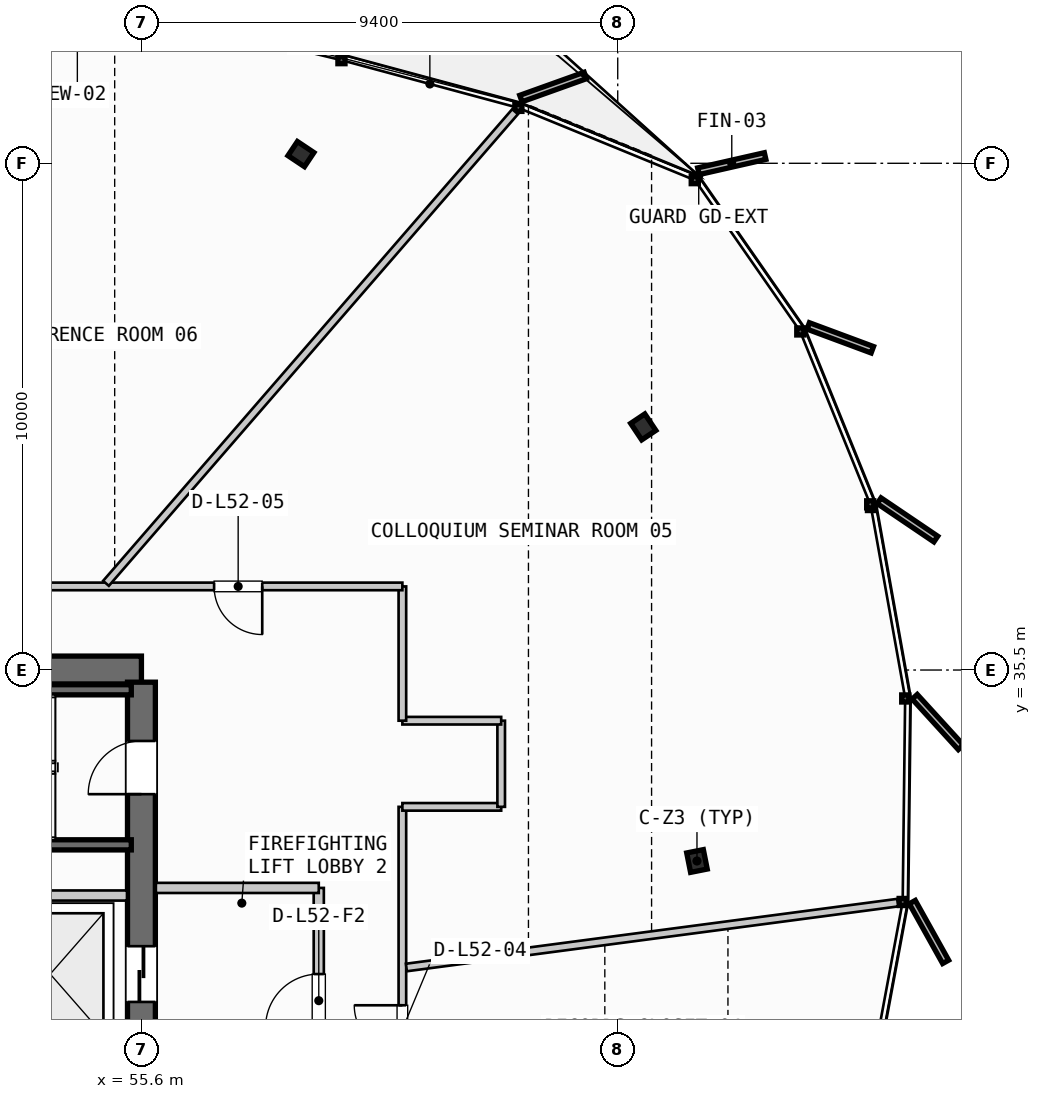
"""IFC4 building model, lengths in metres.
Left out: names, types, materials, properties, quantities, classifications, styles, units other than length and angle.
Written with IfcOpenShell. Run it as: python <this file> out.ifc"""

import sys

from ifc_helpers import new_model, si_unit, direction, frame, frame_2d, origin, origin_2d, place, context, subcontext, project, spatial, rectangle, i_section, extrude, source, transform, mapped, element, fill, save


model = new_model("IFC4")
c1 = context("Model", 3, precision=1e-05, world=origin(), true_north=direction((0.0, 1.0)))
c2 = subcontext(c1, "Body", "Model", "MODEL_VIEW")
j1 = project(units=[si_unit("LENGTHUNIT", "METRE"), si_unit("PLANEANGLEUNIT", "RADIAN")], contexts=[c1])
p1 = place(None, origin())
s1 = spatial("IfcSite", under=j1, at=p1, CompositionType="ELEMENT")
p2 = place(p1, origin())
s2 = spatial("IfcBuilding", under=s1, at=p2, CompositionType="ELEMENT")
p3 = place(p2, frame((0.0, 0.0, 200.9)))
s3 = spatial("IfcBuildingStorey", under=s2, at=p3, CompositionType="ELEMENT", Elevation=200.9)
p4 = place(p3, frame((55.6, 35.5, 0.0), z_axis=(0.0, 0.0, 1.0), x_axis=(-1.0, 0.0, 0.0)))
e1 = element("IfcWall", 1, at=p4, inside=s3, PredefinedType="SHEAR", context=c2, shape_type="SweptSolid", body=[
    extrude(rectangle(XDim=17.6, YDim=0.55, at=frame_2d((8.8, 0.0))), origin(), (0.0, 0.0, 1.0), 3.26),
])
p5 = place(p4, frame((8.05, 0.0, 0.0)))
e2 = element("IfcOpeningElement", 2, at=p5, cuts=e1, PredefinedType="OPENING", context=c2, shape_type="SweptSolid", body=[
    extrude(rectangle(XDim=1.5, YDim=2.2, at=frame_2d((0.75, 1.1))), frame((0.0, 0.285, 0.0), z_axis=(0.0, -1.0, 0.0), x_axis=(1.0, 0.0, 0.0)), (0.0, 0.0, 1.0), 0.57),
])
p6 = place(p4, frame((15.1, 0.0, 0.0)))
e3 = element("IfcOpeningElement", 3, at=p6, cuts=e1, PredefinedType="OPENING", context=c2, shape_type="SweptSolid", body=[
    extrude(rectangle(XDim=0.95, YDim=2.15, at=frame_2d((0.475, 1.075))), frame((0.0, 0.285, 0.0), z_axis=(0.0, -1.0, 0.0), x_axis=(1.0, 0.0, 0.0)), (0.0, 0.0, 1.0), 0.57),
])
p7 = place(p4, frame((12.6, 0.0, 0.0)))
e4 = element("IfcOpeningElement", 4, at=p7, cuts=e1, PredefinedType="OPENING", context=c2, shape_type="SweptSolid", body=[
    extrude(rectangle(XDim=0.95, YDim=2.15, at=frame_2d((0.475, 1.075))), frame((0.0, 0.285, 0.0), z_axis=(0.0, -1.0, 0.0), x_axis=(1.0, 0.0, 0.0)), (0.0, 0.0, 1.0), 0.57),
])
p8 = place(p4, frame((10.45, 0.0, 0.0)))
e5 = element("IfcOpeningElement", 5, at=p8, cuts=e1, PredefinedType="OPENING", context=c2, shape_type="SweptSolid", body=[
    extrude(rectangle(XDim=0.95, YDim=2.15, at=frame_2d((0.475, 1.075))), frame((0.0, 0.285, 0.0), z_axis=(0.0, -1.0, 0.0), x_axis=(1.0, 0.0, 0.0)), (0.0, 0.0, 1.0), 0.57),
])
p9 = place(p3, frame((55.6, 20.34, 0.0), z_axis=(0.0, 0.0, 1.0), x_axis=(0.0, 1.0, 0.0)))
e6 = element("IfcWall", 6, at=p9, inside=s3, PredefinedType="SHEAR", context=c2, shape_type="SweptSolid", body=[
    extrude(rectangle(XDim=14.92, YDim=0.55, at=frame_2d((7.46, 0.0))), origin(), (0.0, 0.0, 1.0), 3.26),
])
p10 = place(p9, frame((12.71, 0.0, 0.0)))
e7 = element("IfcOpeningElement", 7, at=p10, cuts=e6, PredefinedType="OPENING", context=c2, shape_type="SweptSolid", body=[
    extrude(rectangle(XDim=1.05, YDim=2.15, at=frame_2d((0.525, 1.075))), frame((0.0, 0.285, 0.0), z_axis=(0.0, -1.0, 0.0), x_axis=(1.0, 0.0, 0.0)), (0.0, 0.0, 1.0), 0.57),
])
p11 = place(p9, frame((8.61, 0.0, 0.0)))
e8 = element("IfcOpeningElement", 8, at=p11, cuts=e6, PredefinedType="OPENING", context=c2, shape_type="SweptSolid", body=[
    extrude(rectangle(XDim=1.1, YDim=2.2, at=frame_2d((0.55, 1.1))), frame((0.0, 0.285, 0.0), z_axis=(0.0, -1.0, 0.0), x_axis=(1.0, 0.0, 0.0)), (0.0, 0.0, 1.0), 0.57),
])
m1 = source(origin(), c2, "Body", "SweptSolid", [
    extrude(i_section(OverallWidth=0.391, OverallDepth=0.335, WebThickness=0.023, FlangeThickness=0.034, FilletRadius=0.015, at=origin_2d()), origin(), (0.0, 0.0, 1.0), 3.26),
])
for number, where, z_axis, x_axis in (
    (9, (66.564, 31.731, 0.0), (0.0, 0.0, 1.0), (0.981, 0.195, 0.0)),
    (10, (65.504, 40.298, 0.0), (0.0, 0.0, 1.0), (0.831, 0.556, 0.0)),
    (11, (58.748, 45.681, 0.0), (0.0, 0.0, 1.0), (0.556, 0.831, 0.0)),
):
    element("IfcColumn", number, at=place(p3, frame(where, z_axis=z_axis, x_axis=x_axis)), inside=s3, PredefinedType="COLUMN", context=c2, shape_type="MappedRepresentation", body=[
        mapped(m1, transform((0.0, 0.0, 0.0), scale=1.0)),
    ])
for number, where, z_axis, x_axis in (
    (12, (48.05, 35.11, 0.0), (0.0, 0.0, 1.0), (1.0, 0.0, 0.0)),
    (13, (55.4, 32.05, 0.0), (0.0, 0.0, 1.0), (-1.0, 0.0, 0.0)),
):
    element("IfcWall", number, at=place(p3, frame(where, z_axis=z_axis, x_axis=x_axis)), inside=s3, PredefinedType="SHEAR", context=c2, shape_type="SweptSolid", body=[
        extrude(rectangle(XDim=7.35, YDim=0.2, at=frame_2d((3.675, 0.0))), origin(), (0.0, 0.0, 1.0), 3.26),
    ])
p12 = place(p3, frame((52.45, 31.05, 0.0), z_axis=(0.0, 0.0, 1.0), x_axis=(1.0, 0.0, 0.0)))
e14 = element("IfcWall", 14, at=p12, inside=s3, PredefinedType="PARTITIONING", context=c2, shape_type="SweptSolid", body=[
    extrude(rectangle(XDim=2.865, YDim=0.2, at=frame_2d((1.433, 0.0))), origin(), (0.0, 0.0, 1.0), 2.595),
])
p13 = place(p3, frame((59.1, 26.8, 0.0), z_axis=(0.0, 0.0, 1.0), x_axis=(0.0, 1.0, 0.0)))
e15 = element("IfcWall", 15, at=p13, inside=s3, PredefinedType="PARTITIONING", context=c2, shape_type="SweptSolid", body=[
    extrude(rectangle(XDim=4.4, YDim=0.2, at=frame_2d((2.2, 0.0))), origin(), (0.0, 0.0, 1.0), 2.595),
])
p14 = place(p13, frame((1.65, 0.0, 0.0)))
e16 = element("IfcOpeningElement", 16, at=p14, cuts=e15, PredefinedType="OPENING", context=c2, shape_type="SweptSolid", body=[
    extrude(rectangle(XDim=1.05, YDim=2.15, at=frame_2d((0.525, 1.075))), frame((0.0, 0.11, 0.0), z_axis=(0.0, -1.0, 0.0), x_axis=(1.0, 0.0, 0.0)), (0.0, 0.0, 1.0), 0.22),
])
p15 = place(p3, frame((55.885, 31.2, 0.0), z_axis=(0.0, 0.0, 1.0), x_axis=(1.0, 0.0, 0.0)))
e17 = element("IfcWall", 17, at=p15, inside=s3, PredefinedType="PARTITIONING", context=c2, shape_type="SweptSolid", body=[
    extrude(rectangle(XDim=3.215, YDim=0.2, at=frame_2d((1.607, 0.0))), origin(), (0.0, 0.0, 1.0), 2.595),
])
p16 = place(p3, frame((60.75, 22.8, 0.0), z_axis=(0.0, 0.0, 1.0), x_axis=(0.0, 1.0, 0.0)))
e18 = element("IfcWall", 18, at=p16, inside=s3, PredefinedType="PARTITIONING", context=c2, shape_type="SweptSolid", body=[
    extrude(rectangle(XDim=10.0, YDim=0.15, at=frame_2d((5.0, 0.0))), origin(), (0.0, 0.0, 1.0), 2.595),
])
p17 = place(p16, frame((2.013, 0.0, 0.0)))
e19 = element("IfcOpeningElement", 19, at=p17, cuts=e18, PredefinedType="OPENING", context=c2, shape_type="SweptSolid", body=[
    extrude(rectangle(XDim=0.95, YDim=2.15, at=frame_2d((0.475, 1.075))), frame((0.0, 0.085, 0.0), z_axis=(0.0, -1.0, 0.0), x_axis=(1.0, 0.0, 0.0)), (0.0, 0.0, 1.0), 0.17),
])
p18 = place(p16, frame((5.134, 0.0, 0.0)))
e20 = element("IfcOpeningElement", 20, at=p18, cuts=e18, PredefinedType="OPENING", context=c2, shape_type="SweptSolid", body=[
    extrude(rectangle(XDim=0.95, YDim=2.15, at=frame_2d((0.475, 1.075))), frame((0.0, 0.085, 0.0), z_axis=(0.0, -1.0, 0.0), x_axis=(1.0, 0.0, 0.0)), (0.0, 0.0, 1.0), 0.17),
])
p19 = place(p3, frame((60.75, 32.8, 0.0), z_axis=(0.0, 0.0, 1.0), x_axis=(1.0, 0.0, 0.0)))
e21 = element("IfcWall", 21, at=p19, inside=s3, PredefinedType="PARTITIONING", context=c2, shape_type="SweptSolid", body=[
    extrude(rectangle(XDim=1.95, YDim=0.15, at=frame_2d((0.975, 0.0))), origin(), (0.0, 0.0, 1.0), 2.595),
])
p20 = place(p3, frame((62.7, 32.8, 0.0), z_axis=(0.0, 0.0, 1.0), x_axis=(0.0, 1.0, 0.0)))
e22 = element("IfcWall", 22, at=p20, inside=s3, PredefinedType="PARTITIONING", context=c2, shape_type="SweptSolid", body=[
    extrude(rectangle(XDim=1.7, YDim=0.15, at=frame_2d((0.85, 0.0))), origin(), (0.0, 0.0, 1.0), 2.595),
])
p21 = place(p3, frame((62.7, 34.5, 0.0), z_axis=(0.0, 0.0, 1.0), x_axis=(-1.0, 0.0, 0.0)))
e23 = element("IfcWall", 23, at=p21, inside=s3, PredefinedType="PARTITIONING", context=c2, shape_type="SweptSolid", body=[
    extrude(rectangle(XDim=1.95, YDim=0.15, at=frame_2d((0.975, 0.0))), origin(), (0.0, 0.0, 1.0), 2.595),
])
p22 = place(p3, frame((60.75, 34.5, 0.0), z_axis=(0.0, 0.0, 1.0), x_axis=(0.0, 1.0, 0.0)))
e24 = element("IfcWall", 24, at=p22, inside=s3, PredefinedType="PARTITIONING", context=c2, shape_type="SweptSolid", body=[
    extrude(rectangle(XDim=2.65, YDim=0.15, at=frame_2d((1.325, 0.0))), origin(), (0.0, 0.0, 1.0), 2.595),
])
p23 = place(p3, frame((60.75, 37.15, 0.0), z_axis=(0.0, 0.0, 1.0), x_axis=(-1.0, 0.0, 0.0)))
e25 = element("IfcWall", 25, at=p23, inside=s3, PredefinedType="PARTITIONING", context=c2, shape_type="SweptSolid", body=[
    extrude(rectangle(XDim=28.35, YDim=0.15, at=frame_2d((14.175, 0.0))), origin(), (0.0, 0.0, 1.0), 2.595),
])
p24 = place(p23, frame((2.766, 0.0, 0.0)))
e26 = element("IfcOpeningElement", 26, at=p24, cuts=e25, PredefinedType="OPENING", context=c2, shape_type="SweptSolid", body=[
    extrude(rectangle(XDim=0.95, YDim=2.15, at=frame_2d((0.475, 1.075))), frame((0.0, 0.085, 0.0), z_axis=(0.0, -1.0, 0.0), x_axis=(1.0, 0.0, 0.0)), (0.0, 0.0, 1.0), 0.17),
])
p25 = place(p23, frame((8.968, 0.0, 0.0)))
e27 = element("IfcOpeningElement", 27, at=p25, cuts=e25, PredefinedType="OPENING", context=c2, shape_type="SweptSolid", body=[
    extrude(rectangle(XDim=0.95, YDim=2.15, at=frame_2d((0.475, 1.075))), frame((0.0, 0.085, 0.0), z_axis=(0.0, -1.0, 0.0), x_axis=(1.0, 0.0, 0.0)), (0.0, 0.0, 1.0), 0.17),
])
p26 = place(p23, frame((13.496, 0.0, 0.0)))
e28 = element("IfcOpeningElement", 28, at=p26, cuts=e25, PredefinedType="OPENING", context=c2, shape_type="SweptSolid", body=[
    extrude(rectangle(XDim=0.95, YDim=2.15, at=frame_2d((0.475, 1.075))), frame((0.0, 0.085, 0.0), z_axis=(0.0, -1.0, 0.0), x_axis=(1.0, 0.0, 0.0)), (0.0, 0.0, 1.0), 0.17),
])
p27 = place(p23, frame((16.571, 0.0, 0.0)))
e29 = element("IfcOpeningElement", 29, at=p27, cuts=e25, PredefinedType="OPENING", context=c2, shape_type="SweptSolid", body=[
    extrude(rectangle(XDim=0.95, YDim=2.15, at=frame_2d((0.475, 1.075))), frame((0.0, 0.085, 0.0), z_axis=(0.0, -1.0, 0.0), x_axis=(1.0, 0.0, 0.0)), (0.0, 0.0, 1.0), 0.17),
])
p28 = place(p23, frame((23.002, 0.0, 0.0)))
e30 = element("IfcOpeningElement", 30, at=p28, cuts=e25, PredefinedType="OPENING", context=c2, shape_type="SweptSolid", body=[
    extrude(rectangle(XDim=0.95, YDim=2.15, at=frame_2d((0.475, 1.075))), frame((0.0, 0.085, 0.0), z_axis=(0.0, -1.0, 0.0), x_axis=(1.0, 0.0, 0.0)), (0.0, 0.0, 1.0), 0.17),
])
p29 = place(p3, frame((60.829, 29.63, 0.0), z_axis=(0.0, 0.0, 1.0), x_axis=(0.991403406957, 0.130840684324, 0.0)))
e31 = element("IfcWall", 31, at=p29, inside=s3, PredefinedType="PARTITIONING", context=c2, shape_type="SweptSolid", body=[
    extrude(rectangle(XDim=9.779, YDim=0.15, at=frame_2d((4.89, 0.0))), origin(), (0.0, 0.0, 1.0), 2.595),
])
p30 = place(p3, frame((54.9, 37.21, 0.0), z_axis=(0.0, 0.0, 1.0), x_axis=(0.655252574178, 0.75540986493, 0.0)))
e32 = element("IfcWall", 32, at=p30, inside=s3, PredefinedType="PARTITIONING", context=c2, shape_type="SweptSolid", body=[
    extrude(rectangle(XDim=12.322, YDim=0.15, at=frame_2d((6.161, 0.0))), origin(), (0.0, 0.0, 1.0), 2.595),
])
m2 = source(origin(), c2, "Body", "SweptSolid", [
    extrude(rectangle(XDim=1.05, YDim=2.15, at=frame_2d((0.525, 1.075))), frame((0.0, 0.025, 0.0), z_axis=(0.0, -1.0, 0.0), x_axis=(1.0, 0.0, 0.0)), (0.0, 0.0, 1.0), 0.05),
])
p31 = place(p10, origin())
e33 = element("IfcDoor", 33, at=p31, inside=s3, OperationType="SINGLE_SWING_LEFT", PredefinedType="DOOR", context=c2, shape_type="MappedRepresentation", body=[
    mapped(m2, transform((0.0, 0.0, 0.0), scale=1.0)),
])
fill(e7, e33)
m3 = source(origin(), c2, "Body", "SweptSolid", [
    extrude(rectangle(XDim=1.1, YDim=2.2, at=frame_2d((0.55, 1.1))), frame((0.0, 0.025, 0.0), z_axis=(0.0, -1.0, 0.0), x_axis=(1.0, 0.0, 0.0)), (0.0, 0.0, 1.0), 0.05),
])
p32 = place(p11, origin())
e34 = element("IfcDoor", 34, at=p32, inside=s3, OperationType="SLIDING_TO_RIGHT", PredefinedType="DOOR", context=c2, shape_type="MappedRepresentation", body=[
    mapped(m3, transform((0.0, 0.0, 0.0), scale=1.0)),
])
fill(e8, e34)
p33 = place(p14, origin())
e35 = element("IfcDoor", 35, at=p33, inside=s3, OperationType="SINGLE_SWING_LEFT", PredefinedType="DOOR", context=c2, shape_type="MappedRepresentation", body=[
    mapped(m2, transform((0.0, 0.0, 0.0), scale=1.0)),
])
fill(e16, e35)
m4 = source(origin(), c2, "Body", "SweptSolid", [
    extrude(rectangle(XDim=0.95, YDim=2.15, at=frame_2d((0.475, 1.075))), frame((0.0, 0.025, 0.0), z_axis=(0.0, -1.0, 0.0), x_axis=(1.0, 0.0, 0.0)), (0.0, 0.0, 1.0), 0.05),
])
p34 = place(p18, origin())
e36 = element("IfcDoor", 36, at=p34, inside=s3, OperationType="SINGLE_SWING_RIGHT", PredefinedType="DOOR", context=c2, shape_type="MappedRepresentation", body=[
    mapped(m4, transform((0.0, 0.0, 0.0), scale=1.0)),
])
fill(e20, e36)
p35 = place(p24, origin())
e37 = element("IfcDoor", 37, at=p35, inside=s3, OperationType="SINGLE_SWING_LEFT", PredefinedType="DOOR", context=c2, shape_type="MappedRepresentation", body=[
    mapped(m4, transform((0.0, 0.0, 0.0), scale=1.0)),
])
fill(e26, e37)
save(model, sys.argv[1])
